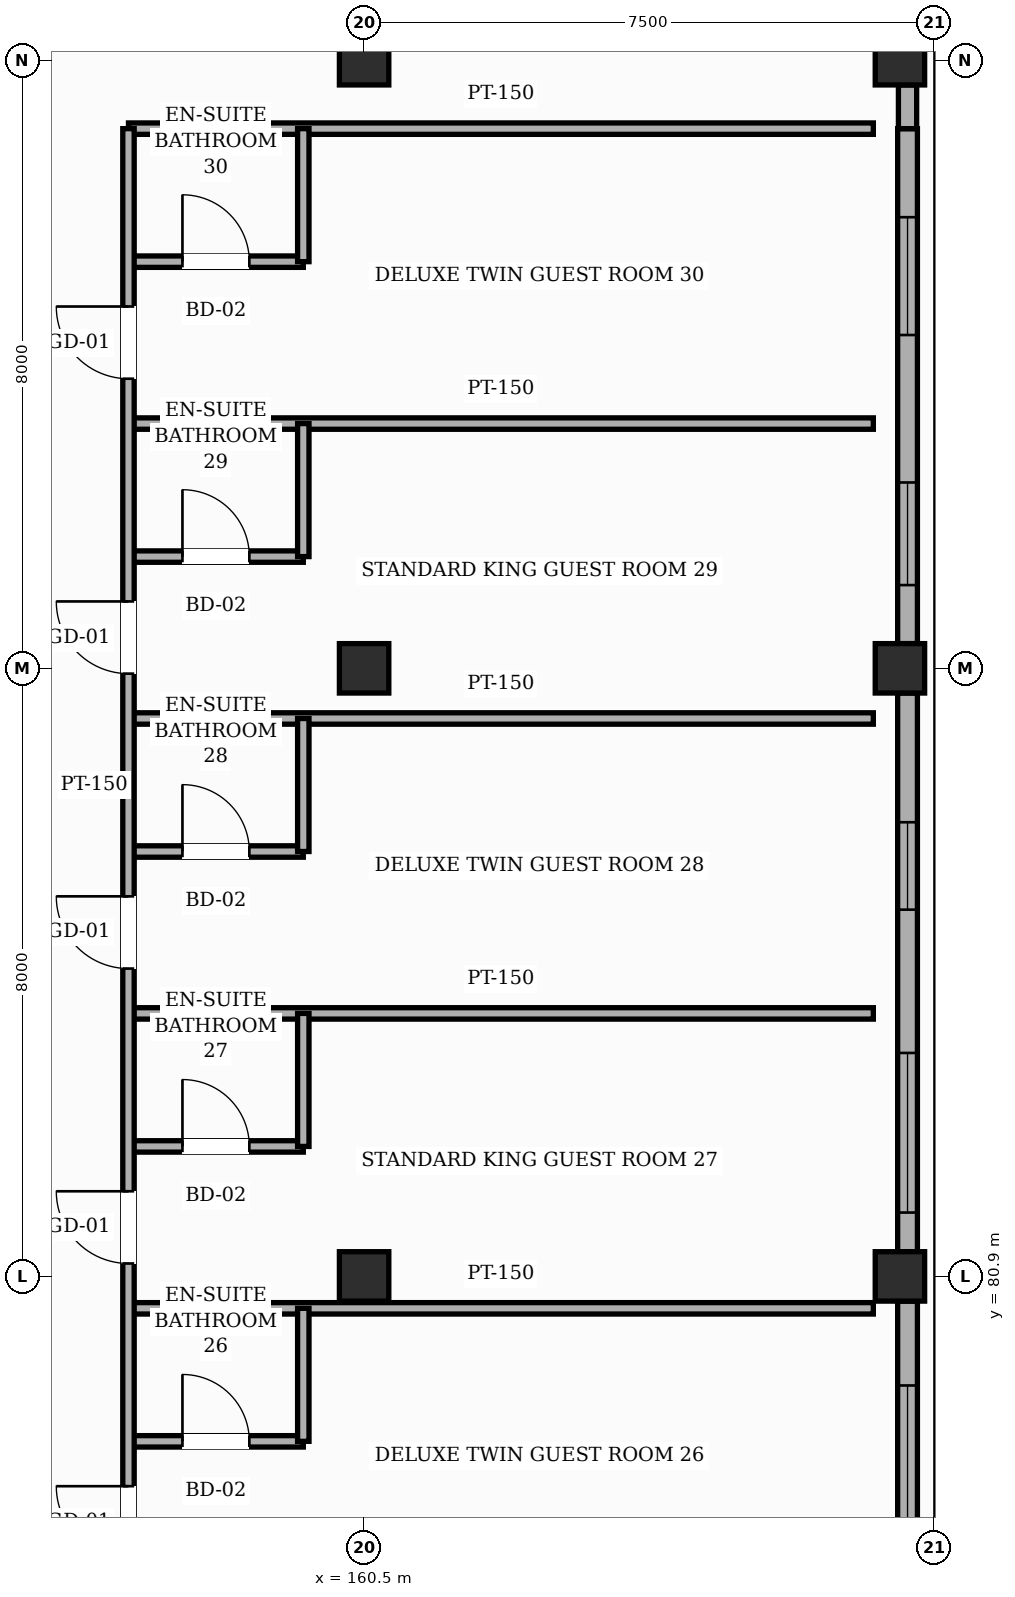
"""IFC4 building model, lengths in metres.
Left out: names, types, materials, properties, quantities, classifications, styles, units other than length and angle.
Written with IfcOpenShell. Run it as: python <this file> out.ifc"""

import sys

from ifc_helpers import new_model, si_unit, direction, frame, frame_2d, origin, origin_2d, place, context, subcontext, project, spatial, rectangle, hollow_rectangle, extrude, element, fill, save


model = new_model("IFC4")
c1 = context("Model", 3, precision=1e-05, world=origin(), true_north=direction((0.0, 1.0)))
c2 = subcontext(c1, "Body", "Model", "MODEL_VIEW")
j1 = project(units=[si_unit("LENGTHUNIT", "METRE"), si_unit("PLANEANGLEUNIT", "RADIAN")], contexts=[c1])
p1 = place(None, origin())
s1 = spatial("IfcSite", under=j1, at=p1, CompositionType="ELEMENT")
p2 = place(p1, origin())
s2 = spatial("IfcBuilding", under=s1, at=p2, CompositionType="ELEMENT")
p3 = place(p2, frame((0.0, 0.0, 15.0)))
s3 = spatial("IfcBuildingStorey", under=s2, at=p3, CompositionType="ELEMENT", Elevation=15.0)
for number, where, z_axis, x_axis in (
    (1, (160.5, 80.9, 0.0), (0.0, 0.0, 1.0), (1.0, 0.0, 0.0)),
    (2, (160.5, 88.9, 0.0), (0.0, 0.0, 1.0), (1.0, 0.0, 0.0)),
    (3, (160.5, 96.9, 0.0), (0.0, 0.0, 1.0), (1.0, 0.0, 0.0)),
    (4, (167.55, 80.9, 0.0), (0.0, 0.0, 1.0), (1.0, 0.0, 0.0)),
    (5, (167.55, 88.9, 0.0), (0.0, 0.0, 1.0), (1.0, 0.0, 0.0)),
    (6, (167.55, 96.9, 0.0), (0.0, 0.0, 1.0), (1.0, 0.0, 0.0)),
):
    element("IfcColumn", number, at=place(p3, frame(where, z_axis=z_axis, x_axis=x_axis)), inside=s3, PredefinedType="COLUMN", context=c2, shape_type="SweptSolid", body=[
        extrude(hollow_rectangle(XDim=0.65, YDim=0.65, WallThickness=0.025, InnerFilletRadius=0.025, OuterFilletRadius=0.05, at=origin_2d()), origin(), (0.0, 0.0, 1.0), 4.8),
    ])
p4 = place(p3, frame((167.65, 80.575, 0.0), z_axis=(0.0, 0.0, 1.0), x_axis=(0.0, -1.0, 0.0)))
e7 = element("IfcWall", 7, at=p4, inside=s3, PredefinedType="SOLIDWALL", context=c2, shape_type="SweptSolid", body=[
    extrude(rectangle(XDim=4.15, YDim=0.26, at=frame_2d((2.075, 0.0))), origin(), (0.0, 0.0, 1.0), 4.545),
])
p5 = place(p4, frame((1.11, 0.0, 0.85)))
e8 = element("IfcOpeningElement", 8, at=p5, cuts=e7, PredefinedType="OPENING", context=c2, shape_type="SweptSolid", body=[
    extrude(rectangle(XDim=1.85, YDim=1.5, at=frame_2d((0.925, 0.75))), frame((0.0, 0.14, 0.0), z_axis=(0.0, -1.0, 0.0), x_axis=(1.0, 0.0, 0.0)), (0.0, 0.0, 1.0), 0.28),
])
p6 = place(p3, frame((167.65, 88.575, 0.0), z_axis=(0.0, 0.0, 1.0), x_axis=(0.0, -1.0, 0.0)))
e9 = element("IfcWall", 9, at=p6, inside=s3, PredefinedType="SOLIDWALL", context=c2, shape_type="SweptSolid", body=[
    extrude(rectangle(XDim=7.35, YDim=0.26, at=frame_2d((3.675, 0.0))), origin(), (0.0, 0.0, 1.0), 3.885),
])
p7 = place(p6, frame((4.735, 0.0, 0.85)))
e10 = element("IfcOpeningElement", 10, at=p7, cuts=e9, PredefinedType="OPENING", context=c2, shape_type="SweptSolid", body=[
    extrude(rectangle(XDim=2.1, YDim=1.5, at=frame_2d((1.05, 0.75))), frame((0.0, 0.14, 0.0), z_axis=(0.0, -1.0, 0.0), x_axis=(1.0, 0.0, 0.0)), (0.0, 0.0, 1.0), 0.28),
])
p8 = place(p6, frame((1.7, 0.0, 0.85)))
e11 = element("IfcOpeningElement", 11, at=p8, cuts=e9, PredefinedType="OPENING", context=c2, shape_type="SweptSolid", body=[
    extrude(rectangle(XDim=1.15, YDim=1.65, at=frame_2d((0.575, 0.825))), frame((0.0, 0.14, 0.0), z_axis=(0.0, -1.0, 0.0), x_axis=(1.0, 0.0, 0.0)), (0.0, 0.0, 1.0), 0.28),
])
p9 = place(p3, frame((167.65, 96.0, 0.0), z_axis=(0.0, 0.0, 1.0), x_axis=(0.0, -1.0, 0.0)))
e12 = element("IfcWall", 12, at=p9, inside=s3, PredefinedType="SOLIDWALL", context=c2, shape_type="SweptSolid", body=[
    extrude(rectangle(XDim=6.775, YDim=0.26, at=frame_2d((3.387, 0.0))), origin(), (0.0, 0.0, 1.0), 3.885),
])
p10 = place(p9, frame((4.655, 0.0, 0.85)))
e13 = element("IfcOpeningElement", 13, at=p10, cuts=e12, PredefinedType="OPENING", context=c2, shape_type="SweptSolid", body=[
    extrude(rectangle(XDim=1.35, YDim=1.65, at=frame_2d((0.675, 0.825))), frame((0.0, 0.14, 0.0), z_axis=(0.0, -1.0, 0.0), x_axis=(1.0, 0.0, 0.0)), (0.0, 0.0, 1.0), 0.28),
])
p11 = place(p9, frame((1.165, 0.0, 0.85)))
e14 = element("IfcOpeningElement", 14, at=p11, cuts=e12, PredefinedType="OPENING", context=c2, shape_type="SweptSolid", body=[
    extrude(rectangle(XDim=1.55, YDim=1.65, at=frame_2d((0.775, 0.825))), frame((0.0, 0.14, 0.0), z_axis=(0.0, -1.0, 0.0), x_axis=(1.0, 0.0, 0.0)), (0.0, 0.0, 1.0), 0.28),
])
p12 = place(p3, frame((167.65, 96.575, 0.0), z_axis=(0.0, 0.0, 1.0), x_axis=(0.0, -1.0, 0.0)))
e15 = element("IfcWall", 15, at=p12, inside=s3, PredefinedType="SOLIDWALL", context=c2, shape_type="SweptSolid", body=[
    extrude(rectangle(XDim=0.575, YDim=0.24, at=frame_2d((0.288, 0.0))), origin(), (0.0, 0.0, 1.0), 3.885),
])
p13 = place(p3, frame((157.4, 78.73, 0.0), z_axis=(0.0, 0.0, 1.0), x_axis=(1.0, 0.0, 0.0)))
e16 = element("IfcWall", 16, at=p13, inside=s3, PredefinedType="PARTITIONING", context=c2, shape_type="SweptSolid", body=[
    extrude(rectangle(XDim=2.3, YDim=0.15, at=frame_2d((1.15, 0.0))), origin(), (0.0, 0.0, 1.0), 4.545),
])
p14 = place(p13, frame((0.71, 0.0, 0.0)))
e17 = element("IfcOpeningElement", 17, at=p14, cuts=e16, PredefinedType="OPENING", context=c2, shape_type="SweptSolid", body=[
    extrude(rectangle(XDim=0.88, YDim=2.12, at=frame_2d((0.44, 1.06))), frame((0.0, 0.085, 0.0), z_axis=(0.0, -1.0, 0.0), x_axis=(1.0, 0.0, 0.0)), (0.0, 0.0, 1.0), 0.17),
])
p15 = place(p3, frame((157.4, 80.48, 0.0), z_axis=(0.0, 0.0, 1.0), x_axis=(1.0, 0.0, 0.0)))
e18 = element("IfcWall", 18, at=p15, inside=s3, PredefinedType="PARTITIONING", context=c2, shape_type="SweptSolid", body=[
    extrude(rectangle(XDim=9.8, YDim=0.15, at=frame_2d((4.9, 0.0))), origin(), (0.0, 0.0, 1.0), 3.095),
])
p16 = place(p3, frame((157.4, 82.61, 0.0), z_axis=(0.0, 0.0, 1.0), x_axis=(1.0, 0.0, 0.0)))
e19 = element("IfcWall", 19, at=p16, inside=s3, PredefinedType="PARTITIONING", context=c2, shape_type="SweptSolid", body=[
    extrude(rectangle(XDim=2.3, YDim=0.15, at=frame_2d((1.15, 0.0))), origin(), (0.0, 0.0, 1.0), 4.545),
])
p17 = place(p16, frame((0.71, 0.0, 0.0)))
e20 = element("IfcOpeningElement", 20, at=p17, cuts=e19, PredefinedType="OPENING", context=c2, shape_type="SweptSolid", body=[
    extrude(rectangle(XDim=0.88, YDim=2.12, at=frame_2d((0.44, 1.06))), frame((0.0, 0.085, 0.0), z_axis=(0.0, -1.0, 0.0), x_axis=(1.0, 0.0, 0.0)), (0.0, 0.0, 1.0), 0.17),
])
p18 = place(p3, frame((157.4, 84.36, 0.0), z_axis=(0.0, 0.0, 1.0), x_axis=(1.0, 0.0, 0.0)))
e21 = element("IfcWall", 21, at=p18, inside=s3, PredefinedType="PARTITIONING", context=c2, shape_type="SweptSolid", body=[
    extrude(rectangle(XDim=9.8, YDim=0.15, at=frame_2d((4.9, 0.0))), origin(), (0.0, 0.0, 1.0), 4.545),
])
p19 = place(p3, frame((157.4, 86.49, 0.0), z_axis=(0.0, 0.0, 1.0), x_axis=(1.0, 0.0, 0.0)))
e22 = element("IfcWall", 22, at=p19, inside=s3, PredefinedType="PARTITIONING", context=c2, shape_type="SweptSolid", body=[
    extrude(rectangle(XDim=2.3, YDim=0.15, at=frame_2d((1.15, 0.0))), origin(), (0.0, 0.0, 1.0), 4.545),
])
p20 = place(p19, frame((0.71, 0.0, 0.0)))
e23 = element("IfcOpeningElement", 23, at=p20, cuts=e22, PredefinedType="OPENING", context=c2, shape_type="SweptSolid", body=[
    extrude(rectangle(XDim=0.88, YDim=2.12, at=frame_2d((0.44, 1.06))), frame((0.0, 0.085, 0.0), z_axis=(0.0, -1.0, 0.0), x_axis=(1.0, 0.0, 0.0)), (0.0, 0.0, 1.0), 0.17),
])
p21 = place(p3, frame((157.4, 88.24, 0.0), z_axis=(0.0, 0.0, 1.0), x_axis=(1.0, 0.0, 0.0)))
e24 = element("IfcWall", 24, at=p21, inside=s3, PredefinedType="PARTITIONING", context=c2, shape_type="SweptSolid", body=[
    extrude(rectangle(XDim=9.8, YDim=0.15, at=frame_2d((4.9, 0.0))), origin(), (0.0, 0.0, 1.0), 4.545),
])
p22 = place(p3, frame((157.4, 90.37, 0.0), z_axis=(0.0, 0.0, 1.0), x_axis=(1.0, 0.0, 0.0)))
e25 = element("IfcWall", 25, at=p22, inside=s3, PredefinedType="PARTITIONING", context=c2, shape_type="SweptSolid", body=[
    extrude(rectangle(XDim=2.3, YDim=0.15, at=frame_2d((1.15, 0.0))), origin(), (0.0, 0.0, 1.0), 4.545),
])
p23 = place(p22, frame((0.71, 0.0, 0.0)))
e26 = element("IfcOpeningElement", 26, at=p23, cuts=e25, PredefinedType="OPENING", context=c2, shape_type="SweptSolid", body=[
    extrude(rectangle(XDim=0.88, YDim=2.12, at=frame_2d((0.44, 1.06))), frame((0.0, 0.085, 0.0), z_axis=(0.0, -1.0, 0.0), x_axis=(1.0, 0.0, 0.0)), (0.0, 0.0, 1.0), 0.17),
])
p24 = place(p3, frame((157.4, 92.12, 0.0), z_axis=(0.0, 0.0, 1.0), x_axis=(1.0, 0.0, 0.0)))
e27 = element("IfcWall", 27, at=p24, inside=s3, PredefinedType="PARTITIONING", context=c2, shape_type="SweptSolid", body=[
    extrude(rectangle(XDim=9.8, YDim=0.15, at=frame_2d((4.9, 0.0))), origin(), (0.0, 0.0, 1.0), 4.545),
])
p25 = place(p3, frame((157.4, 94.25, 0.0), z_axis=(0.0, 0.0, 1.0), x_axis=(1.0, 0.0, 0.0)))
e28 = element("IfcWall", 28, at=p25, inside=s3, PredefinedType="PARTITIONING", context=c2, shape_type="SweptSolid", body=[
    extrude(rectangle(XDim=2.3, YDim=0.15, at=frame_2d((1.15, 0.0))), origin(), (0.0, 0.0, 1.0), 4.545),
])
p26 = place(p25, frame((0.71, 0.0, 0.0)))
e29 = element("IfcOpeningElement", 29, at=p26, cuts=e28, PredefinedType="OPENING", context=c2, shape_type="SweptSolid", body=[
    extrude(rectangle(XDim=0.88, YDim=2.12, at=frame_2d((0.44, 1.06))), frame((0.0, 0.085, 0.0), z_axis=(0.0, -1.0, 0.0), x_axis=(1.0, 0.0, 0.0)), (0.0, 0.0, 1.0), 0.17),
])
p27 = place(p3, frame((157.4, 96.0, 0.0), z_axis=(0.0, 0.0, 1.0), x_axis=(1.0, 0.0, 0.0)))
e30 = element("IfcWall", 30, at=p27, inside=s3, PredefinedType="PARTITIONING", context=c2, shape_type="SweptSolid", body=[
    extrude(rectangle(XDim=9.8, YDim=0.15, at=frame_2d((4.9, 0.0))), origin(), (0.0, 0.0, 1.0), 4.545),
])
p28 = place(p3, frame((157.4, 76.6, 0.0), z_axis=(0.0, 0.0, 1.0), x_axis=(0.0, 1.0, 0.0)))
e31 = element("IfcWall", 31, at=p28, inside=s3, PredefinedType="PARTITIONING", context=c2, shape_type="SweptSolid", body=[
    extrude(rectangle(XDim=19.4, YDim=0.15, at=frame_2d((9.7, 0.0))), origin(), (0.0, 0.0, 1.0), 4.545),
])
p29 = place(p28, frame((0.59, 0.0, 0.0)))
e32 = element("IfcOpeningElement", 32, at=p29, cuts=e31, PredefinedType="OPENING", context=c2, shape_type="SweptSolid", body=[
    extrude(rectangle(XDim=0.95, YDim=2.15, at=frame_2d((0.475, 1.075))), frame((0.0, 0.085, 0.0), z_axis=(0.0, -1.0, 0.0), x_axis=(1.0, 0.0, 0.0)), (0.0, 0.0, 1.0), 0.17),
])
p30 = place(p28, frame((4.47, 0.0, 0.0)))
e33 = element("IfcOpeningElement", 33, at=p30, cuts=e31, PredefinedType="OPENING", context=c2, shape_type="SweptSolid", body=[
    extrude(rectangle(XDim=0.95, YDim=2.15, at=frame_2d((0.475, 1.075))), frame((0.0, 0.085, 0.0), z_axis=(0.0, -1.0, 0.0), x_axis=(1.0, 0.0, 0.0)), (0.0, 0.0, 1.0), 0.17),
])
p31 = place(p28, frame((8.35, 0.0, 0.0)))
e34 = element("IfcOpeningElement", 34, at=p31, cuts=e31, PredefinedType="OPENING", context=c2, shape_type="SweptSolid", body=[
    extrude(rectangle(XDim=0.95, YDim=2.15, at=frame_2d((0.475, 1.075))), frame((0.0, 0.085, 0.0), z_axis=(0.0, -1.0, 0.0), x_axis=(1.0, 0.0, 0.0)), (0.0, 0.0, 1.0), 0.17),
])
p32 = place(p28, frame((12.23, 0.0, 0.0)))
e35 = element("IfcOpeningElement", 35, at=p32, cuts=e31, PredefinedType="OPENING", context=c2, shape_type="SweptSolid", body=[
    extrude(rectangle(XDim=0.95, YDim=2.15, at=frame_2d((0.475, 1.075))), frame((0.0, 0.085, 0.0), z_axis=(0.0, -1.0, 0.0), x_axis=(1.0, 0.0, 0.0)), (0.0, 0.0, 1.0), 0.17),
])
p33 = place(p28, frame((16.11, 0.0, 0.0)))
e36 = element("IfcOpeningElement", 36, at=p33, cuts=e31, PredefinedType="OPENING", context=c2, shape_type="SweptSolid", body=[
    extrude(rectangle(XDim=0.95, YDim=2.15, at=frame_2d((0.475, 1.075))), frame((0.0, 0.085, 0.0), z_axis=(0.0, -1.0, 0.0), x_axis=(1.0, 0.0, 0.0)), (0.0, 0.0, 1.0), 0.17),
])
for number, where, z_axis, x_axis in (
    (37, (159.7, 78.73, 0.0), (0.0, 0.0, 1.0), (0.0, 1.0, 0.0)),
    (38, (159.7, 82.61, 0.0), (0.0, 0.0, 1.0), (0.0, 1.0, 0.0)),
    (39, (159.7, 86.49, 0.0), (0.0, 0.0, 1.0), (0.0, 1.0, 0.0)),
    (40, (159.7, 90.37, 0.0), (0.0, 0.0, 1.0), (0.0, 1.0, 0.0)),
    (41, (159.7, 94.25, 0.0), (0.0, 0.0, 1.0), (0.0, 1.0, 0.0)),
):
    element("IfcWall", number, at=place(p3, frame(where, z_axis=z_axis, x_axis=x_axis)), inside=s3, PredefinedType="PARTITIONING", context=c2, shape_type="SweptSolid", body=[
        extrude(rectangle(XDim=1.75, YDim=0.15, at=frame_2d((0.875, 0.0))), origin(), (0.0, 0.0, 1.0), 4.545),
    ])
p34 = place(p5, origin())
e42 = element("IfcWindow", 42, at=p34, inside=s3, PartitioningType="SINGLE_PANEL", PredefinedType="WINDOW", context=c2, shape_type="SweptSolid", body=[
    extrude(rectangle(XDim=1.85, YDim=1.5, at=frame_2d((0.925, 0.75))), frame((0.0, 0.03, 0.0), z_axis=(0.0, -1.0, 0.0), x_axis=(1.0, 0.0, 0.0)), (0.0, 0.0, 1.0), 0.06),
])
fill(e8, e42)
p35 = place(p7, origin())
e43 = element("IfcWindow", 43, at=p35, inside=s3, PartitioningType="SINGLE_PANEL", PredefinedType="WINDOW", context=c2, shape_type="SweptSolid", body=[
    extrude(rectangle(XDim=2.1, YDim=1.5, at=frame_2d((1.05, 0.75))), frame((0.0, 0.03, 0.0), z_axis=(0.0, -1.0, 0.0), x_axis=(1.0, 0.0, 0.0)), (0.0, 0.0, 1.0), 0.06),
])
fill(e10, e43)
p36 = place(p8, origin())
e44 = element("IfcWindow", 44, at=p36, inside=s3, PartitioningType="SINGLE_PANEL", PredefinedType="WINDOW", context=c2, shape_type="SweptSolid", body=[
    extrude(rectangle(XDim=1.15, YDim=1.65, at=frame_2d((0.575, 0.825))), frame((0.0, 0.03, 0.0), z_axis=(0.0, -1.0, 0.0), x_axis=(1.0, 0.0, 0.0)), (0.0, 0.0, 1.0), 0.06),
])
fill(e11, e44)
p37 = place(p10, origin())
e45 = element("IfcWindow", 45, at=p37, inside=s3, PartitioningType="SINGLE_PANEL", PredefinedType="WINDOW", context=c2, shape_type="SweptSolid", body=[
    extrude(rectangle(XDim=1.35, YDim=1.65, at=frame_2d((0.675, 0.825))), frame((0.0, 0.03, 0.0), z_axis=(0.0, -1.0, 0.0), x_axis=(1.0, 0.0, 0.0)), (0.0, 0.0, 1.0), 0.06),
])
fill(e13, e45)
p38 = place(p11, origin())
e46 = element("IfcWindow", 46, at=p38, inside=s3, PartitioningType="SINGLE_PANEL", PredefinedType="WINDOW", context=c2, shape_type="SweptSolid", body=[
    extrude(rectangle(XDim=1.55, YDim=1.65, at=frame_2d((0.775, 0.825))), frame((0.0, 0.03, 0.0), z_axis=(0.0, -1.0, 0.0), x_axis=(1.0, 0.0, 0.0)), (0.0, 0.0, 1.0), 0.06),
])
fill(e14, e46)
p39 = place(p29, origin())
e47 = element("IfcDoor", 47, at=p39, inside=s3, OperationType="SINGLE_SWING_RIGHT", PredefinedType="DOOR", context=c2, shape_type="SweptSolid", body=[
    extrude(rectangle(XDim=0.95, YDim=2.15, at=frame_2d((0.475, 1.075))), frame((0.0, 0.025, 0.0), z_axis=(0.0, -1.0, 0.0), x_axis=(1.0, 0.0, 0.0)), (0.0, 0.0, 1.0), 0.05),
])
fill(e32, e47)
p40 = place(p14, origin())
e48 = element("IfcDoor", 48, at=p40, inside=s3, OperationType="SINGLE_SWING_LEFT", PredefinedType="DOOR", context=c2, shape_type="SweptSolid", body=[
    extrude(rectangle(XDim=0.88, YDim=2.12, at=frame_2d((0.44, 1.06))), frame((0.0, 0.025, 0.0), z_axis=(0.0, -1.0, 0.0), x_axis=(1.0, 0.0, 0.0)), (0.0, 0.0, 1.0), 0.05),
])
fill(e17, e48)
p41 = place(p30, origin())
e49 = element("IfcDoor", 49, at=p41, inside=s3, OperationType="SINGLE_SWING_RIGHT", PredefinedType="DOOR", context=c2, shape_type="SweptSolid", body=[
    extrude(rectangle(XDim=0.95, YDim=2.15, at=frame_2d((0.475, 1.075))), frame((0.0, 0.025, 0.0), z_axis=(0.0, -1.0, 0.0), x_axis=(1.0, 0.0, 0.0)), (0.0, 0.0, 1.0), 0.05),
])
fill(e33, e49)
p42 = place(p17, origin())
e50 = element("IfcDoor", 50, at=p42, inside=s3, OperationType="SINGLE_SWING_LEFT", PredefinedType="DOOR", context=c2, shape_type="SweptSolid", body=[
    extrude(rectangle(XDim=0.88, YDim=2.12, at=frame_2d((0.44, 1.06))), frame((0.0, 0.025, 0.0), z_axis=(0.0, -1.0, 0.0), x_axis=(1.0, 0.0, 0.0)), (0.0, 0.0, 1.0), 0.05),
])
fill(e20, e50)
p43 = place(p31, origin())
e51 = element("IfcDoor", 51, at=p43, inside=s3, OperationType="SINGLE_SWING_RIGHT", PredefinedType="DOOR", context=c2, shape_type="SweptSolid", body=[
    extrude(rectangle(XDim=0.95, YDim=2.15, at=frame_2d((0.475, 1.075))), frame((0.0, 0.025, 0.0), z_axis=(0.0, -1.0, 0.0), x_axis=(1.0, 0.0, 0.0)), (0.0, 0.0, 1.0), 0.05),
])
fill(e34, e51)
p44 = place(p20, origin())
e52 = element("IfcDoor", 52, at=p44, inside=s3, OperationType="SINGLE_SWING_LEFT", PredefinedType="DOOR", context=c2, shape_type="SweptSolid", body=[
    extrude(rectangle(XDim=0.88, YDim=2.12, at=frame_2d((0.44, 1.06))), frame((0.0, 0.025, 0.0), z_axis=(0.0, -1.0, 0.0), x_axis=(1.0, 0.0, 0.0)), (0.0, 0.0, 1.0), 0.05),
])
fill(e23, e52)
p45 = place(p32, origin())
e53 = element("IfcDoor", 53, at=p45, inside=s3, OperationType="SINGLE_SWING_RIGHT", PredefinedType="DOOR", context=c2, shape_type="SweptSolid", body=[
    extrude(rectangle(XDim=0.95, YDim=2.15, at=frame_2d((0.475, 1.075))), frame((0.0, 0.025, 0.0), z_axis=(0.0, -1.0, 0.0), x_axis=(1.0, 0.0, 0.0)), (0.0, 0.0, 1.0), 0.05),
])
fill(e35, e53)
p46 = place(p23, origin())
e54 = element("IfcDoor", 54, at=p46, inside=s3, OperationType="SINGLE_SWING_LEFT", PredefinedType="DOOR", context=c2, shape_type="SweptSolid", body=[
    extrude(rectangle(XDim=0.88, YDim=2.12, at=frame_2d((0.44, 1.06))), frame((0.0, 0.025, 0.0), z_axis=(0.0, -1.0, 0.0), x_axis=(1.0, 0.0, 0.0)), (0.0, 0.0, 1.0), 0.05),
])
fill(e26, e54)
p47 = place(p33, origin())
e55 = element("IfcDoor", 55, at=p47, inside=s3, OperationType="SINGLE_SWING_RIGHT", PredefinedType="DOOR", context=c2, shape_type="SweptSolid", body=[
    extrude(rectangle(XDim=0.95, YDim=2.15, at=frame_2d((0.475, 1.075))), frame((0.0, 0.025, 0.0), z_axis=(0.0, -1.0, 0.0), x_axis=(1.0, 0.0, 0.0)), (0.0, 0.0, 1.0), 0.05),
])
fill(e36, e55)
p48 = place(p26, origin())
e56 = element("IfcDoor", 56, at=p48, inside=s3, OperationType="SINGLE_SWING_LEFT", PredefinedType="DOOR", context=c2, shape_type="SweptSolid", body=[
    extrude(rectangle(XDim=0.88, YDim=2.12, at=frame_2d((0.44, 1.06))), frame((0.0, 0.025, 0.0), z_axis=(0.0, -1.0, 0.0), x_axis=(1.0, 0.0, 0.0)), (0.0, 0.0, 1.0), 0.05),
])
fill(e29, e56)
save(model, sys.argv[1])
